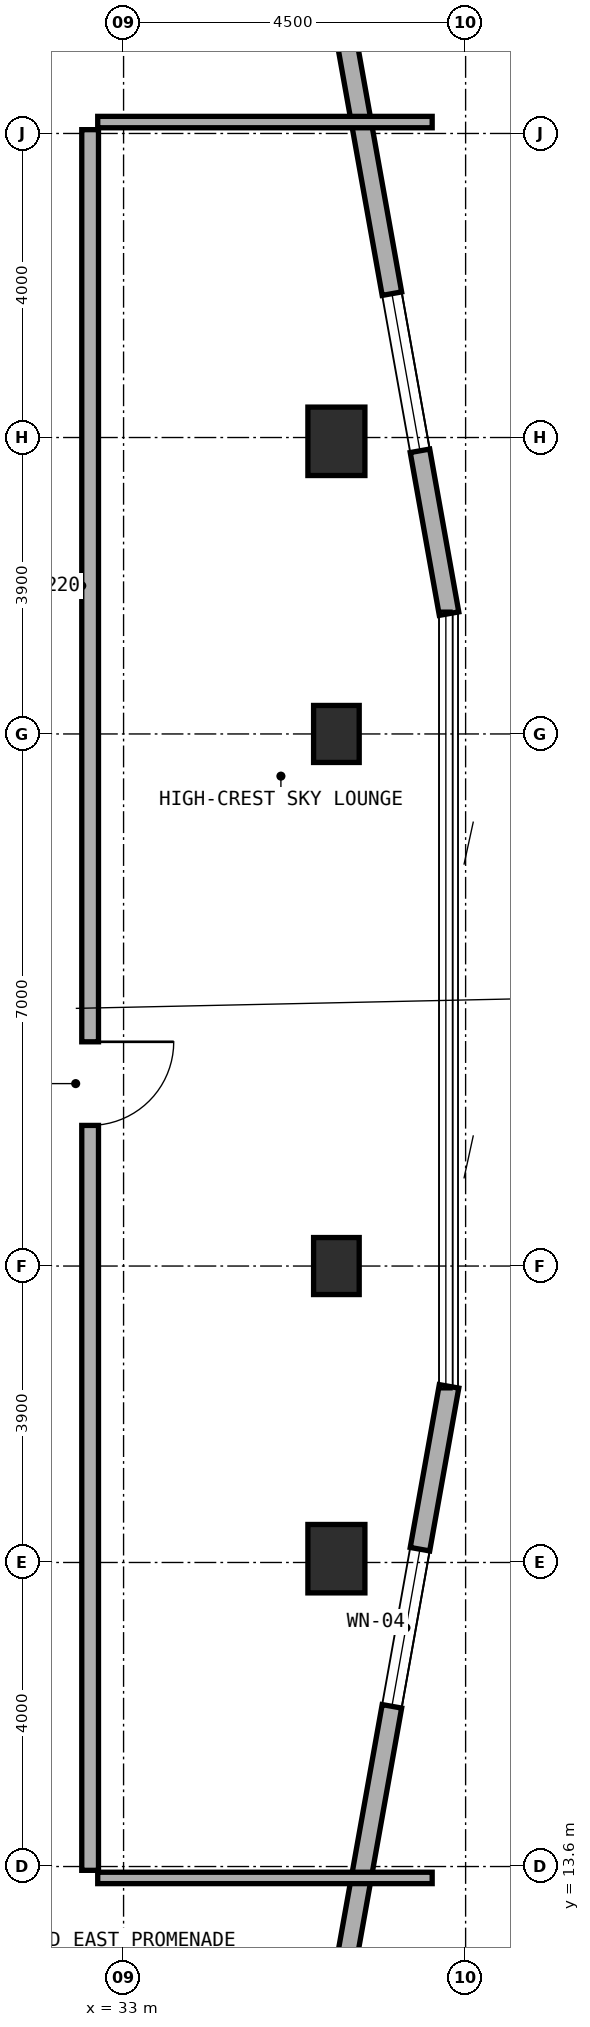
"""IFC4 building model, lengths in metres.
Left out: names, types, materials, properties, quantities, classifications, styles, units other than length and angle.
Written with IfcOpenShell. Run it as: python <this file> out.ifc"""

import sys

from ifc_helpers import new_model, si_unit, direction, frame, frame_2d, origin, origin_2d, place, context, subcontext, project, spatial, rectangle, extrude, element, fill, save


model = new_model("IFC4")
c1 = context("Model", 3, precision=1e-05, world=origin(), true_north=direction((0.0, 1.0)))
c2 = subcontext(c1, "Body", "Model", "MODEL_VIEW")
j1 = project(units=[si_unit("LENGTHUNIT", "METRE"), si_unit("PLANEANGLEUNIT", "RADIAN")], contexts=[c1])
p1 = place(None, origin())
s1 = spatial("IfcSite", under=j1, at=p1, CompositionType="ELEMENT")
p2 = place(p1, origin())
s2 = spatial("IfcBuilding", under=s1, at=p2, CompositionType="ELEMENT")
p3 = place(p2, frame((0.0, 0.0, 272.0)))
s3 = spatial("IfcBuildingStorey", under=s2, at=p3, CompositionType="ELEMENT", Elevation=272.0)
for number, where, z_axis, x_axis in (
    (1, (35.8, 21.5, 0.0), (0.0, 0.0, 1.0), (1.0, 0.0, 0.0)),
    (2, (35.8, 28.5, 0.0), (0.0, 0.0, 1.0), (1.0, 0.0, 0.0)),
):
    element("IfcColumn", number, at=place(p3, frame(where, z_axis=z_axis, x_axis=x_axis)), inside=s3, PredefinedType="COLUMN", context=c2, shape_type="SweptSolid", body=[
        extrude(rectangle(XDim=0.6, YDim=0.75, at=origin_2d()), origin(), (0.0, 0.0, 1.0), 4.8),
    ])
for number, where, z_axis, x_axis in (
    (3, (35.8, 17.65, 0.0), (0.0, 0.0, 1.0), (1.0, 0.0, 0.0)),
    (4, (35.8, 32.35, 0.0), (0.0, 0.0, 1.0), (1.0, 0.0, 0.0)),
):
    element("IfcColumn", number, at=place(p3, frame(where, z_axis=z_axis, x_axis=x_axis)), inside=s3, PredefinedType="COLUMN", context=c2, shape_type="SweptSolid", body=[
        extrude(rectangle(XDim=0.75, YDim=0.9, at=origin_2d()), origin(), (0.0, 0.0, 1.0), 4.8),
    ])
p4 = place(p3, frame((35.871, 12.015, 0.0), z_axis=(0.0, 0.0, 1.0), x_axis=(0.175766426993, 0.984431898682, 0.0)))
e5 = element("IfcWall", 5, at=p4, inside=s3, PredefinedType="STANDARD", context=c2, shape_type="SweptSolid", body=[
    extrude(rectangle(XDim=8.027, YDim=0.26, at=frame_2d((4.014, 0.0))), origin(), (0.0, 0.0, 1.0), 2.74),
])
p5 = place(p4, frame((3.751, 0.0, 0.85)))
e6 = element("IfcOpeningElement", 6, at=p5, cuts=e5, PredefinedType="OPENING", context=c2, shape_type="SweptSolid", body=[
    extrude(rectangle(XDim=2.1, YDim=1.5, at=frame_2d((1.05, 0.75))), frame((0.0, 0.14, 0.0), z_axis=(0.0, -1.0, 0.0), x_axis=(1.0, 0.0, 0.0)), (0.0, 0.0, 1.0), 0.28),
])
p6 = place(p3, frame((37.282, 30.083, 0.0), z_axis=(0.0, 0.0, 1.0), x_axis=(-0.175766426993, 0.984431898682, 0.0)))
e7 = element("IfcWall", 7, at=p6, inside=s3, PredefinedType="STANDARD", context=c2, shape_type="SweptSolid", body=[
    extrude(rectangle(XDim=8.027, YDim=0.26, at=frame_2d((4.014, 0.0))), origin(), (0.0, 0.0, 1.0), 2.74),
])
p7 = place(p6, frame((2.176, 0.0, 0.85)))
e8 = element("IfcOpeningElement", 8, at=p7, cuts=e7, PredefinedType="OPENING", context=c2, shape_type="SweptSolid", body=[
    extrude(rectangle(XDim=2.1, YDim=1.5, at=frame_2d((1.05, 0.75))), frame((0.0, 0.14, 0.0), z_axis=(0.0, -1.0, 0.0), x_axis=(1.0, 0.0, 0.0)), (0.0, 0.0, 1.0), 0.28),
])
for number, where, z_axis, x_axis in (
    (9, (32.66, 13.45, 0.0), (0.0, 0.0, 1.0), (1.0, 0.0, 0.0)),
    (10, (32.66, 36.55, 0.0), (0.0, 0.0, 1.0), (1.0, 0.0, 0.0)),
):
    element("IfcWall", number, at=place(p3, frame(where, z_axis=z_axis, x_axis=x_axis)), inside=s3, PredefinedType="PARTITIONING", context=c2, shape_type="SweptSolid", body=[
        extrude(rectangle(XDim=4.4, YDim=0.15, at=frame_2d((2.2, 0.0))), origin(), (0.0, 0.0, 1.0), 2.72),
    ])
p8 = place(p3, frame((32.56, 13.55, 0.0), z_axis=(0.0, 0.0, 1.0), x_axis=(0.0, 1.0, 0.0)))
e11 = element("IfcWall", 11, at=p8, inside=s3, PredefinedType="SOLIDWALL", context=c2, shape_type="SweptSolid", body=[
    extrude(rectangle(XDim=22.9, YDim=0.22, at=frame_2d((11.45, 0.0))), origin(), (0.0, 0.0, 1.0), 2.72),
])
p9 = place(p8, frame((9.8, 0.0, 0.0)))
e12 = element("IfcOpeningElement", 12, at=p9, cuts=e11, PredefinedType="OPENING", context=c2, shape_type="SweptSolid", body=[
    extrude(rectangle(XDim=1.1, YDim=2.1, at=frame_2d((0.55, 1.05))), frame((0.0, 0.12, 0.0), z_axis=(0.0, -1.0, 0.0), x_axis=(1.0, 0.0, 0.0)), (0.0, 0.0, 1.0), 0.24),
])
p10 = place(p5, origin())
e13 = element("IfcWindow", 13, at=p10, inside=s3, PartitioningType="SINGLE_PANEL", PredefinedType="WINDOW", context=c2, shape_type="SweptSolid", body=[
    extrude(rectangle(XDim=2.1, YDim=1.5, at=frame_2d((1.05, 0.75))), frame((0.0, 0.03, 0.0), z_axis=(0.0, -1.0, 0.0), x_axis=(1.0, 0.0, 0.0)), (0.0, 0.0, 1.0), 0.06),
])
fill(e6, e13)
p11 = place(p7, origin())
e14 = element("IfcWindow", 14, at=p11, inside=s3, PartitioningType="SINGLE_PANEL", PredefinedType="WINDOW", context=c2, shape_type="SweptSolid", body=[
    extrude(rectangle(XDim=2.1, YDim=1.5, at=frame_2d((1.05, 0.75))), frame((0.0, 0.03, 0.0), z_axis=(0.0, -1.0, 0.0), x_axis=(1.0, 0.0, 0.0)), (0.0, 0.0, 1.0), 0.06),
])
fill(e8, e14)
p12 = place(p9, frame((1.1, 0.0, 0.0), z_axis=(0.0, 0.0, 1.0), x_axis=(-1.0, 0.0, 0.0)))
e15 = element("IfcDoor", 15, at=p12, inside=s3, OperationType="SINGLE_SWING_LEFT", PredefinedType="DOOR", context=c2, shape_type="SweptSolid", body=[
    extrude(rectangle(XDim=1.1, YDim=2.1, at=frame_2d((0.55, 1.05))), frame((0.0, 0.025, 0.0), z_axis=(0.0, -1.0, 0.0), x_axis=(1.0, 0.0, 0.0)), (0.0, 0.0, 1.0), 0.05),
])
fill(e12, e15)
save(model, sys.argv[1])
